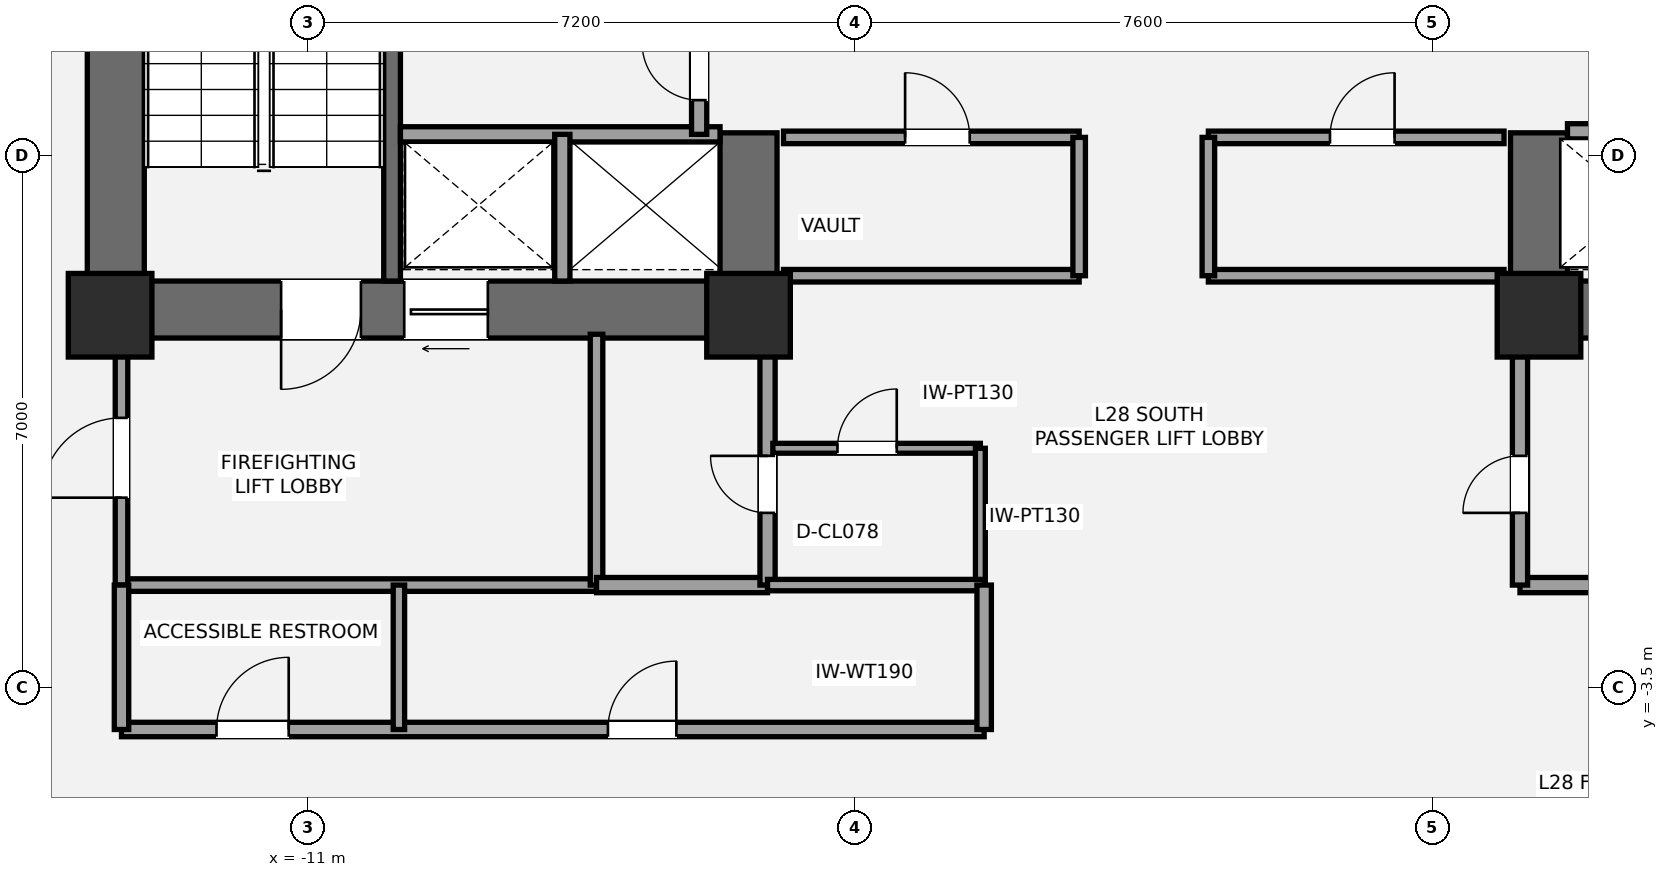
"""IFC4 building model, lengths in metres.
Left out: names, types, materials, properties, quantities, classifications, styles, units other than length and angle.
Written with IfcOpenShell. Run it as: python <this file> out.ifc"""

import sys

from ifc_helpers import new_model, si_unit, direction, frame, frame_2d, origin, origin_2d, place, context, subcontext, project, spatial, rectangle, extrude, element, fill, save


model = new_model("IFC4")
c1 = context("Model", 3, precision=1e-05, world=origin(), true_north=direction((0.0, 1.0)))
c2 = subcontext(c1, "Body", "Model", "MODEL_VIEW")
j1 = project(units=[si_unit("LENGTHUNIT", "METRE"), si_unit("PLANEANGLEUNIT", "RADIAN")], contexts=[c1])
p1 = place(None, origin())
s1 = spatial("IfcSite", under=j1, at=p1, CompositionType="ELEMENT")
p2 = place(p1, origin())
s2 = spatial("IfcBuilding", under=s1, at=p2, CompositionType="ELEMENT")
p3 = place(p2, frame((0.0, 0.0, 107.1)))
s3 = spatial("IfcBuildingStorey", under=s2, at=p3, CompositionType="ELEMENT", Elevation=107.1)
p4 = place(p3, frame((-13.525, 1.1, 0.0), z_axis=(0.0, 0.0, 1.0), x_axis=(0.0, 1.0, 0.0)))
e1 = element("IfcWall", 1, at=p4, inside=s3, PredefinedType="SHEAR", context=c2, shape_type="SweptSolid", body=[
    extrude(rectangle(XDim=8.65, YDim=0.75, at=frame_2d((4.325, 0.0))), origin(), (0.0, 0.0, 1.0), 3.5),
])
p5 = place(p3, frame((-4.825, 1.475, 0.0), z_axis=(0.0, 0.0, 1.0), x_axis=(-1.0, 0.0, 0.0)))
e2 = element("IfcWall", 2, at=p5, inside=s3, PredefinedType="SHEAR", context=c2, shape_type="SweptSolid", body=[
    extrude(rectangle(XDim=9.075, YDim=0.75, at=frame_2d((4.538, 0.0))), origin(), (0.0, 0.0, 1.0), 3.5),
])
p6 = place(p5, frame((5.475, 0.0, 0.0)))
e3 = element("IfcOpeningElement", 3, at=p6, cuts=e2, PredefinedType="OPENING", context=c2, shape_type="SweptSolid", body=[
    extrude(rectangle(XDim=1.05, YDim=2.15, at=frame_2d((0.525, 1.075))), frame((0.0, 0.385, 0.0), z_axis=(0.0, -1.0, 0.0), x_axis=(1.0, 0.0, 0.0)), (0.0, 0.0, 1.0), 0.77),
])
p7 = place(p5, frame((3.805, 0.0, 0.0)))
e4 = element("IfcOpeningElement", 4, at=p7, cuts=e2, PredefinedType="OPENING", context=c2, shape_type="SweptSolid", body=[
    extrude(rectangle(XDim=1.1, YDim=2.2, at=frame_2d((0.55, 1.1))), frame((0.0, 0.385, 0.0), z_axis=(0.0, -1.0, 0.0), x_axis=(1.0, 0.0, 0.0)), (0.0, 0.0, 1.0), 0.77),
])
p8 = place(p3, frame((-5.2, 1.1, 0.0), z_axis=(0.0, 0.0, 1.0), x_axis=(0.0, 1.0, 0.0)))
e5 = element("IfcWall", 5, at=p8, inside=s3, PredefinedType="SHEAR", context=c2, shape_type="SweptSolid", body=[
    extrude(rectangle(XDim=2.7, YDim=0.75, at=frame_2d((1.35, 0.0))), origin(), (0.0, 0.0, 1.0), 3.5),
])
p9 = place(p3, frame((-9.89, 1.85, 0.0), z_axis=(0.0, 0.0, 1.0), x_axis=(0.0, 1.0, 0.0)))
e6 = element("IfcWall", 6, at=p9, inside=s3, PredefinedType="SHEAR", context=c2, shape_type="SweptSolid", body=[
    extrude(rectangle(XDim=7.15, YDim=0.22, at=frame_2d((3.575, 0.0))), origin(), (0.0, 0.0, 1.0), 3.5),
])
p10 = place(p3, frame((13.9, 1.475, 0.0), z_axis=(0.0, 0.0, 1.0), x_axis=(-1.0, 0.0, 0.0)))
e7 = element("IfcWall", 7, at=p10, inside=s3, PredefinedType="SHEAR", context=c2, shape_type="SweptSolid", body=[
    extrude(rectangle(XDim=9.075, YDim=0.75, at=frame_2d((4.538, 0.0))), origin(), (0.0, 0.0, 1.0), 3.5),
])
p11 = place(p10, frame((2.55, 0.0, 0.0)))
e8 = element("IfcOpeningElement", 8, at=p11, cuts=e7, PredefinedType="OPENING", context=c2, shape_type="SweptSolid", body=[
    extrude(rectangle(XDim=1.05, YDim=2.15, at=frame_2d((0.525, 1.075))), frame((0.0, 0.385, 0.0), z_axis=(0.0, -1.0, 0.0), x_axis=(1.0, 0.0, 0.0)), (0.0, 0.0, 1.0), 0.77),
])
p12 = place(p10, frame((4.55, 0.0, 0.0)))
e9 = element("IfcOpeningElement", 9, at=p12, cuts=e7, PredefinedType="OPENING", context=c2, shape_type="SweptSolid", body=[
    extrude(rectangle(XDim=1.1, YDim=2.2, at=frame_2d((0.55, 1.1))), frame((0.0, 0.385, 0.0), z_axis=(0.0, -1.0, 0.0), x_axis=(1.0, 0.0, 0.0)), (0.0, 0.0, 1.0), 0.77),
])
p13 = place(p3, frame((5.2, 1.1, 0.0), z_axis=(0.0, 0.0, 1.0), x_axis=(0.0, 1.0, 0.0)))
e10 = element("IfcWall", 10, at=p13, inside=s3, PredefinedType="SHEAR", context=c2, shape_type="SweptSolid", body=[
    extrude(rectangle(XDim=2.7, YDim=0.75, at=frame_2d((1.35, 0.0))), origin(), (0.0, 0.0, 1.0), 3.5),
])
for number, where, z_axis, x_axis in (
    (11, (-13.6, 1.4, 0.0), (0.0, 0.0, 1.0), (1.0, 0.0, 0.0)),
    (12, (-5.2, 1.4, 0.0), (0.0, 0.0, 1.0), (1.0, 0.0, 0.0)),
    (13, (5.2, 1.4, 0.0), (0.0, 0.0, 1.0), (1.0, 0.0, 0.0)),
):
    element("IfcColumn", number, at=place(p3, frame(where, z_axis=z_axis, x_axis=x_axis)), inside=s3, PredefinedType="COLUMN", context=c2, shape_type="SweptSolid", body=[
        extrude(rectangle(XDim=1.1, YDim=1.1, at=origin_2d()), origin(), (0.0, 0.0, 1.0), 3.5),
    ])
p14 = place(p3, frame((-13.45, -2.15, 0.0), z_axis=(0.0, 0.0, 1.0), x_axis=(1.0, 0.0, 0.0)))
e14 = element("IfcWall", 14, at=p14, inside=s3, PredefinedType="PARTITIONING", context=c2, shape_type="SweptSolid", body=[
    extrude(rectangle(XDim=6.25, YDim=0.165, at=frame_2d((3.125, 0.0))), origin(), (0.0, 0.0, 1.0), 2.763),
])
p15 = place(p3, frame((-13.45, -2.15, 0.0), z_axis=(0.0, 0.0, 1.0), x_axis=(0.0, 1.0, 0.0)))
e15 = element("IfcWall", 15, at=p15, inside=s3, PredefinedType="PARTITIONING", context=c2, shape_type="SweptSolid", body=[
    extrude(rectangle(XDim=3.3, YDim=0.165, at=frame_2d((1.65, 0.0))), origin(), (0.0, 0.0, 1.0), 2.763),
])
p16 = place(p15, frame((1.15, 0.0, 0.0)))
e16 = element("IfcOpeningElement", 16, at=p16, cuts=e15, PredefinedType="OPENING", context=c2, shape_type="SweptSolid", body=[
    extrude(rectangle(XDim=1.05, YDim=2.15, at=frame_2d((0.525, 1.075))), frame((0.0, 0.093, 0.0), z_axis=(0.0, -1.0, 0.0), x_axis=(1.0, 0.0, 0.0)), (0.0, 0.0, 1.0), 0.185),
])
p17 = place(p3, frame((-7.2, -2.15, 0.0), z_axis=(0.0, 0.0, 1.0), x_axis=(0.0, 1.0, 0.0)))
e17 = element("IfcWall", 17, at=p17, inside=s3, PredefinedType="PARTITIONING", context=c2, shape_type="SweptSolid", body=[
    extrude(rectangle(XDim=3.3, YDim=0.165, at=frame_2d((1.65, 0.0))), origin(), (0.0, 0.0, 1.0), 2.763),
])
p18 = place(p3, frame((-7.2, -2.15, 0.0), z_axis=(0.0, 0.0, 1.0), x_axis=(1.0, 0.0, 0.0)))
e18 = element("IfcWall", 18, at=p18, inside=s3, PredefinedType="SOLIDWALL", context=c2, shape_type="SweptSolid", body=[
    extrude(rectangle(XDim=2.25, YDim=0.2, at=frame_2d((1.125, 0.0))), origin(), (0.0, 0.0, 1.0), 2.763),
])
p19 = place(p3, frame((-4.95, -2.15, 0.0), z_axis=(0.0, 0.0, 1.0), x_axis=(0.0, 1.0, 0.0)))
e19 = element("IfcWall", 19, at=p19, inside=s3, PredefinedType="SOLIDWALL", context=c2, shape_type="SweptSolid", body=[
    extrude(rectangle(XDim=3.3, YDim=0.2, at=frame_2d((1.65, 0.0))), origin(), (0.0, 0.0, 1.0), 2.763),
])
p20 = place(p19, frame((0.95, 0.0, 0.0)))
e20 = element("IfcOpeningElement", 20, at=p20, cuts=e19, PredefinedType="OPENING", context=c2, shape_type="SweptSolid", body=[
    extrude(rectangle(XDim=0.75, YDim=2.1, at=frame_2d((0.375, 1.05))), frame((0.0, 0.11, 0.0), z_axis=(0.0, -1.0, 0.0), x_axis=(1.0, 0.0, 0.0)), (0.0, 0.0, 1.0), 0.22),
])
p21 = place(p3, frame((4.95, -2.15, 0.0), z_axis=(0.0, 0.0, 1.0), x_axis=(1.0, 0.0, 0.0)))
e21 = element("IfcWall", 21, at=p21, inside=s3, PredefinedType="SOLIDWALL", context=c2, shape_type="SweptSolid", body=[
    extrude(rectangle(XDim=2.25, YDim=0.2, at=frame_2d((1.125, 0.0))), origin(), (0.0, 0.0, 1.0), 2.763),
])
p22 = place(p3, frame((4.95, -2.15, 0.0), z_axis=(0.0, 0.0, 1.0), x_axis=(0.0, 1.0, 0.0)))
e22 = element("IfcWall", 22, at=p22, inside=s3, PredefinedType="SOLIDWALL", context=c2, shape_type="SweptSolid", body=[
    extrude(rectangle(XDim=3.3, YDim=0.2, at=frame_2d((1.65, 0.0))), origin(), (0.0, 0.0, 1.0), 3.31),
])
p23 = place(p22, frame((0.95, 0.0, 0.0)))
e23 = element("IfcOpeningElement", 23, at=p23, cuts=e22, PredefinedType="OPENING", context=c2, shape_type="SweptSolid", body=[
    extrude(rectangle(XDim=0.75, YDim=2.1, at=frame_2d((0.375, 1.05))), frame((0.0, 0.11, 0.0), z_axis=(0.0, -1.0, 0.0), x_axis=(1.0, 0.0, 0.0)), (0.0, 0.0, 1.0), 0.22),
])
p24 = place(p3, frame((-4.88, -0.35, 0.0), z_axis=(0.0, 0.0, 1.0), x_axis=(1.0, 0.0, 0.0)))
e24 = element("IfcWall", 24, at=p24, inside=s3, PredefinedType="PARTITIONING", context=c2, shape_type="SweptSolid", body=[
    extrude(rectangle(XDim=2.73, YDim=0.13, at=frame_2d((1.365, 0.0))), origin(), (0.0, 0.0, 1.0), 2.763),
])
p25 = place(p24, frame((0.85, 0.0, 0.0)))
e25 = element("IfcOpeningElement", 25, at=p25, cuts=e24, PredefinedType="OPENING", context=c2, shape_type="SweptSolid", body=[
    extrude(rectangle(XDim=0.78, YDim=2.1, at=frame_2d((0.39, 1.05))), frame((0.0, 0.075, 0.0), z_axis=(0.0, -1.0, 0.0), x_axis=(1.0, 0.0, 0.0)), (0.0, 0.0, 1.0), 0.15),
])
p26 = place(p3, frame((-2.15, -2.15, 0.0), z_axis=(0.0, 0.0, 1.0), x_axis=(0.0, 1.0, 0.0)))
e26 = element("IfcWall", 26, at=p26, inside=s3, PredefinedType="PARTITIONING", context=c2, shape_type="SweptSolid", body=[
    extrude(rectangle(XDim=1.8, YDim=0.13, at=frame_2d((0.9, 0.0))), origin(), (0.0, 0.0, 1.0), 3.31),
])
p27 = place(p3, frame((-9.78, 3.78, 0.0), z_axis=(0.0, 0.0, 1.0), x_axis=(1.0, 0.0, 0.0)))
e27 = element("IfcWall", 27, at=p27, inside=s3, PredefinedType="SOLIDWALL", context=c2, shape_type="SweptSolid", body=[
    extrude(rectangle(XDim=4.205, YDim=0.2, at=frame_2d((2.103, 0.0))), origin(), (0.0, 0.0, 1.0), 3.31),
])
p28 = place(p3, frame((-7.65, 1.85, 0.0), z_axis=(0.0, 0.0, 1.0), x_axis=(0.0, 1.0, 0.0)))
e28 = element("IfcWall", 28, at=p28, inside=s3, PredefinedType="SOLIDWALL", context=c2, shape_type="SweptSolid", body=[
    extrude(rectangle(XDim=1.93, YDim=0.2, at=frame_2d((0.965, 0.0))), origin(), (0.0, 0.0, 1.0), 3.31),
])
p29 = place(p3, frame((-5.85, 3.78, 0.0), z_axis=(0.0, 0.0, 1.0), x_axis=(0.0, 1.0, 0.0)))
e29 = element("IfcWall", 29, at=p29, inside=s3, PredefinedType="SOLIDWALL", context=c2, shape_type="SweptSolid", body=[
    extrude(rectangle(XDim=1.69, YDim=0.2, at=frame_2d((0.845, 0.0))), origin(), (0.0, 0.0, 1.0), 3.31),
])
p30 = place(p29, frame((0.45, 0.0, 0.0)))
e30 = element("IfcOpeningElement", 30, at=p30, cuts=e29, PredefinedType="OPENING", context=c2, shape_type="SweptSolid", body=[
    extrude(rectangle(XDim=0.75, YDim=2.1, at=frame_2d((0.375, 1.05))), frame((0.0, 0.11, 0.0), z_axis=(0.0, -1.0, 0.0), x_axis=(1.0, 0.0, 0.0)), (0.0, 0.0, 1.0), 0.22),
])
p31 = place(p3, frame((5.575, 3.82, 0.0), z_axis=(0.0, 0.0, 1.0), x_axis=(1.0, 0.0, 0.0)))
e31 = element("IfcWall", 31, at=p31, inside=s3, PredefinedType="SOLIDWALL", context=c2, shape_type="SweptSolid", body=[
    extrude(rectangle(XDim=4.205, YDim=0.2, at=frame_2d((2.103, 0.0))), origin(), (0.0, 0.0, 1.0), 3.31),
])
p32 = place(p31, frame((0.65, 0.0, 0.0)))
e32 = element("IfcOpeningElement", 32, at=p32, cuts=e31, PredefinedType="OPENING", context=c2, shape_type="SweptSolid", body=[
    extrude(rectangle(XDim=1.2, YDim=2.2, at=frame_2d((0.6, 1.1))), frame((0.0, 0.11, 0.0), z_axis=(0.0, -1.0, 0.0), x_axis=(1.0, 0.0, 0.0)), (0.0, 0.0, 1.0), 0.22),
])
p33 = place(p3, frame((-4.74, 1.92, 0.0), z_axis=(0.0, 0.0, 1.0), x_axis=(1.0, 0.0, 0.0)))
e33 = element("IfcWall", 33, at=p33, inside=s3, PredefinedType="PARTITIONING", context=c2, shape_type="SweptSolid", body=[
    extrude(rectangle(XDim=3.89, YDim=0.165, at=frame_2d((1.945, 0.0))), origin(), (0.0, 0.0, 1.0), 2.3),
])
p34 = place(p3, frame((-4.74, 3.74, 0.0), z_axis=(0.0, 0.0, 1.0), x_axis=(1.0, 0.0, 0.0)))
e34 = element("IfcWall", 34, at=p34, inside=s3, PredefinedType="PARTITIONING", context=c2, shape_type="SweptSolid", body=[
    extrude(rectangle(XDim=3.89, YDim=0.165, at=frame_2d((1.945, 0.0))), origin(), (0.0, 0.0, 1.0), 3.31),
])
p35 = place(p34, frame((1.6, 0.0, 0.0)))
e35 = element("IfcOpeningElement", 35, at=p35, cuts=e34, PredefinedType="OPENING", context=c2, shape_type="SweptSolid", body=[
    extrude(rectangle(XDim=0.85, YDim=2.1, at=frame_2d((0.425, 1.05))), frame((0.0, 0.093, 0.0), z_axis=(0.0, -1.0, 0.0), x_axis=(1.0, 0.0, 0.0)), (0.0, 0.0, 1.0), 0.185),
])
p36 = place(p3, frame((-0.85, 1.92, 0.0), z_axis=(0.0, 0.0, 1.0), x_axis=(0.0, 1.0, 0.0)))
e36 = element("IfcWall", 36, at=p36, inside=s3, PredefinedType="PARTITIONING", context=c2, shape_type="SweptSolid", body=[
    extrude(rectangle(XDim=1.82, YDim=0.165, at=frame_2d((0.91, 0.0))), origin(), (0.0, 0.0, 1.0), 3.31),
])
p37 = place(p3, frame((0.85, 1.92, 0.0), z_axis=(0.0, 0.0, 1.0), x_axis=(1.0, 0.0, 0.0)))
e37 = element("IfcWall", 37, at=p37, inside=s3, PredefinedType="PARTITIONING", context=c2, shape_type="SweptSolid", body=[
    extrude(rectangle(XDim=3.89, YDim=0.165, at=frame_2d((1.945, 0.0))), origin(), (0.0, 0.0, 1.0), 2.3),
])
p38 = place(p3, frame((0.85, 3.74, 0.0), z_axis=(0.0, 0.0, 1.0), x_axis=(1.0, 0.0, 0.0)))
e38 = element("IfcWall", 38, at=p38, inside=s3, PredefinedType="PARTITIONING", context=c2, shape_type="SweptSolid", body=[
    extrude(rectangle(XDim=3.89, YDim=0.165, at=frame_2d((1.945, 0.0))), origin(), (0.0, 0.0, 1.0), 3.31),
])
p39 = place(p38, frame((1.6, 0.0, 0.0)))
e39 = element("IfcOpeningElement", 39, at=p39, cuts=e38, PredefinedType="OPENING", context=c2, shape_type="SweptSolid", body=[
    extrude(rectangle(XDim=0.85, YDim=2.1, at=frame_2d((0.425, 1.05))), frame((0.0, 0.093, 0.0), z_axis=(0.0, -1.0, 0.0), x_axis=(1.0, 0.0, 0.0)), (0.0, 0.0, 1.0), 0.185),
])
p40 = place(p3, frame((0.85, 1.92, 0.0), z_axis=(0.0, 0.0, 1.0), x_axis=(0.0, 1.0, 0.0)))
e40 = element("IfcWall", 40, at=p40, inside=s3, PredefinedType="PARTITIONING", context=c2, shape_type="SweptSolid", body=[
    extrude(rectangle(XDim=1.82, YDim=0.165, at=frame_2d((0.91, 0.0))), origin(), (0.0, 0.0, 1.0), 3.31),
])
p41 = place(p3, frame((-13.45, -4.05, 0.0), z_axis=(0.0, 0.0, 1.0), x_axis=(1.0, 0.0, 0.0)))
e41 = element("IfcWall", 41, at=p41, inside=s3, PredefinedType="PLUMBINGWALL", context=c2, shape_type="SweptSolid", body=[
    extrude(rectangle(XDim=11.35, YDim=0.19, at=frame_2d((5.675, 0.0))), origin(), (0.0, 0.0, 1.0), 2.763),
])
p42 = place(p41, frame((1.25, 0.0, 0.0)))
e42 = element("IfcOpeningElement", 42, at=p42, cuts=e41, PredefinedType="OPENING", context=c2, shape_type="SweptSolid", body=[
    extrude(rectangle(XDim=0.95, YDim=2.15, at=frame_2d((0.475, 1.075))), frame((0.0, 0.105, 0.0), z_axis=(0.0, -1.0, 0.0), x_axis=(1.0, 0.0, 0.0)), (0.0, 0.0, 1.0), 0.21),
])
p43 = place(p41, frame((6.4, 0.0, 0.0)))
e43 = element("IfcOpeningElement", 43, at=p43, cuts=e41, PredefinedType="OPENING", context=c2, shape_type="SweptSolid", body=[
    extrude(rectangle(XDim=0.9, YDim=2.1, at=frame_2d((0.45, 1.05))), frame((0.0, 0.105, 0.0), z_axis=(0.0, -1.0, 0.0), x_axis=(1.0, 0.0, 0.0)), (0.0, 0.0, 1.0), 0.21),
])
p44 = place(p3, frame((-4.95, -2.15, 0.0), z_axis=(0.0, 0.0, 1.0), x_axis=(1.0, 0.0, 0.0)))
e44 = element("IfcWall", 44, at=p44, inside=s3, PredefinedType="PLUMBINGWALL", context=c2, shape_type="SweptSolid", body=[
    extrude(rectangle(XDim=2.85, YDim=0.15, at=frame_2d((1.425, 0.0))), origin(), (0.0, 0.0, 1.0), 2.763),
])
p45 = place(p3, frame((-13.45, -4.05, 0.0), z_axis=(0.0, 0.0, 1.0), x_axis=(0.0, 1.0, 0.0)))
e45 = element("IfcWall", 45, at=p45, inside=s3, PredefinedType="PLUMBINGWALL", context=c2, shape_type="SweptSolid", body=[
    extrude(rectangle(XDim=1.9, YDim=0.19, at=frame_2d((0.95, 0.0))), origin(), (0.0, 0.0, 1.0), 2.763),
])
p46 = place(p3, frame((-2.1, -4.05, 0.0), z_axis=(0.0, 0.0, 1.0), x_axis=(0.0, 1.0, 0.0)))
e46 = element("IfcWall", 46, at=p46, inside=s3, PredefinedType="PLUMBINGWALL", context=c2, shape_type="SweptSolid", body=[
    extrude(rectangle(XDim=1.9, YDim=0.19, at=frame_2d((0.95, 0.0))), origin(), (0.0, 0.0, 1.0), 3.31),
])
p47 = place(p3, frame((-9.8, -4.05, 0.0), z_axis=(0.0, 0.0, 1.0), x_axis=(0.0, 1.0, 0.0)))
e47 = element("IfcWall", 47, at=p47, inside=s3, PredefinedType="PLUMBINGWALL", context=c2, shape_type="SweptSolid", body=[
    extrude(rectangle(XDim=1.9, YDim=0.15, at=frame_2d((0.95, 0.0))), origin(), (0.0, 0.0, 1.0), 3.31),
])
p48 = place(p6, origin())
e48 = element("IfcDoor", 48, at=p48, inside=s3, OperationType="SINGLE_SWING_RIGHT", PredefinedType="DOOR", context=c2, shape_type="SweptSolid", body=[
    extrude(rectangle(XDim=1.05, YDim=2.15, at=frame_2d((0.525, 1.075))), frame((0.0, 0.025, 0.0), z_axis=(0.0, -1.0, 0.0), x_axis=(1.0, 0.0, 0.0)), (0.0, 0.0, 1.0), 0.05),
])
fill(e3, e48)
p49 = place(p16, origin())
e49 = element("IfcDoor", 49, at=p49, inside=s3, OperationType="SINGLE_SWING_LEFT", PredefinedType="DOOR", context=c2, shape_type="SweptSolid", body=[
    extrude(rectangle(XDim=1.05, YDim=2.15, at=frame_2d((0.525, 1.075))), frame((0.0, 0.025, 0.0), z_axis=(0.0, -1.0, 0.0), x_axis=(1.0, 0.0, 0.0)), (0.0, 0.0, 1.0), 0.05),
])
fill(e16, e49)
p50 = place(p20, origin())
e50 = element("IfcDoor", 50, at=p50, inside=s3, OperationType="SINGLE_SWING_RIGHT", PredefinedType="DOOR", context=c2, shape_type="SweptSolid", body=[
    extrude(rectangle(XDim=0.75, YDim=2.1, at=frame_2d((0.375, 1.05))), frame((0.0, 0.025, 0.0), z_axis=(0.0, -1.0, 0.0), x_axis=(1.0, 0.0, 0.0)), (0.0, 0.0, 1.0), 0.05),
])
fill(e20, e50)
p51 = place(p23, origin())
e51 = element("IfcDoor", 51, at=p51, inside=s3, OperationType="SINGLE_SWING_LEFT", PredefinedType="DOOR", context=c2, shape_type="SweptSolid", body=[
    extrude(rectangle(XDim=0.75, YDim=2.1, at=frame_2d((0.375, 1.05))), frame((0.0, 0.025, 0.0), z_axis=(0.0, -1.0, 0.0), x_axis=(1.0, 0.0, 0.0)), (0.0, 0.0, 1.0), 0.05),
])
fill(e23, e51)
p52 = place(p25, origin())
e52 = element("IfcDoor", 52, at=p52, inside=s3, OperationType="SINGLE_SWING_RIGHT", PredefinedType="DOOR", context=c2, shape_type="SweptSolid", body=[
    extrude(rectangle(XDim=0.78, YDim=2.1, at=frame_2d((0.39, 1.05))), frame((0.0, 0.025, 0.0), z_axis=(0.0, -1.0, 0.0), x_axis=(1.0, 0.0, 0.0)), (0.0, 0.0, 1.0), 0.05),
])
fill(e25, e52)
p53 = place(p7, origin())
e53 = element("IfcDoor", 53, at=p53, inside=s3, OperationType="SLIDING_TO_LEFT", PredefinedType="DOOR", context=c2, shape_type="SweptSolid", body=[
    extrude(rectangle(XDim=1.1, YDim=2.2, at=frame_2d((0.55, 1.1))), frame((0.0, 0.025, 0.0), z_axis=(0.0, -1.0, 0.0), x_axis=(1.0, 0.0, 0.0)), (0.0, 0.0, 1.0), 0.05),
])
fill(e4, e53)
p54 = place(p30, origin())
e54 = element("IfcDoor", 54, at=p54, inside=s3, OperationType="SINGLE_SWING_RIGHT", PredefinedType="DOOR", context=c2, shape_type="SweptSolid", body=[
    extrude(rectangle(XDim=0.75, YDim=2.1, at=frame_2d((0.375, 1.05))), frame((0.0, 0.025, 0.0), z_axis=(0.0, -1.0, 0.0), x_axis=(1.0, 0.0, 0.0)), (0.0, 0.0, 1.0), 0.05),
])
fill(e30, e54)
p55 = place(p35, origin())
e55 = element("IfcDoor", 55, at=p55, inside=s3, OperationType="SINGLE_SWING_LEFT", PredefinedType="DOOR", context=c2, shape_type="SweptSolid", body=[
    extrude(rectangle(XDim=0.85, YDim=2.1, at=frame_2d((0.425, 1.05))), frame((0.0, 0.025, 0.0), z_axis=(0.0, -1.0, 0.0), x_axis=(1.0, 0.0, 0.0)), (0.0, 0.0, 1.0), 0.05),
])
fill(e35, e55)
p56 = place(p39, origin())
e56 = element("IfcDoor", 56, at=p56, inside=s3, OperationType="SINGLE_SWING_RIGHT", PredefinedType="DOOR", context=c2, shape_type="SweptSolid", body=[
    extrude(rectangle(XDim=0.85, YDim=2.1, at=frame_2d((0.425, 1.05))), frame((0.0, 0.025, 0.0), z_axis=(0.0, -1.0, 0.0), x_axis=(1.0, 0.0, 0.0)), (0.0, 0.0, 1.0), 0.05),
])
fill(e39, e56)
p57 = place(p42, origin())
e57 = element("IfcDoor", 57, at=p57, inside=s3, OperationType="SINGLE_SWING_RIGHT", PredefinedType="DOOR", context=c2, shape_type="SweptSolid", body=[
    extrude(rectangle(XDim=0.95, YDim=2.15, at=frame_2d((0.475, 1.075))), frame((0.0, 0.025, 0.0), z_axis=(0.0, -1.0, 0.0), x_axis=(1.0, 0.0, 0.0)), (0.0, 0.0, 1.0), 0.05),
])
fill(e42, e57)
p58 = place(p43, origin())
e58 = element("IfcDoor", 58, at=p58, inside=s3, OperationType="SINGLE_SWING_RIGHT", PredefinedType="DOOR", context=c2, shape_type="SweptSolid", body=[
    extrude(rectangle(XDim=0.9, YDim=2.1, at=frame_2d((0.45, 1.05))), frame((0.0, 0.025, 0.0), z_axis=(0.0, -1.0, 0.0), x_axis=(1.0, 0.0, 0.0)), (0.0, 0.0, 1.0), 0.05),
])
fill(e43, e58)
save(model, sys.argv[1])
